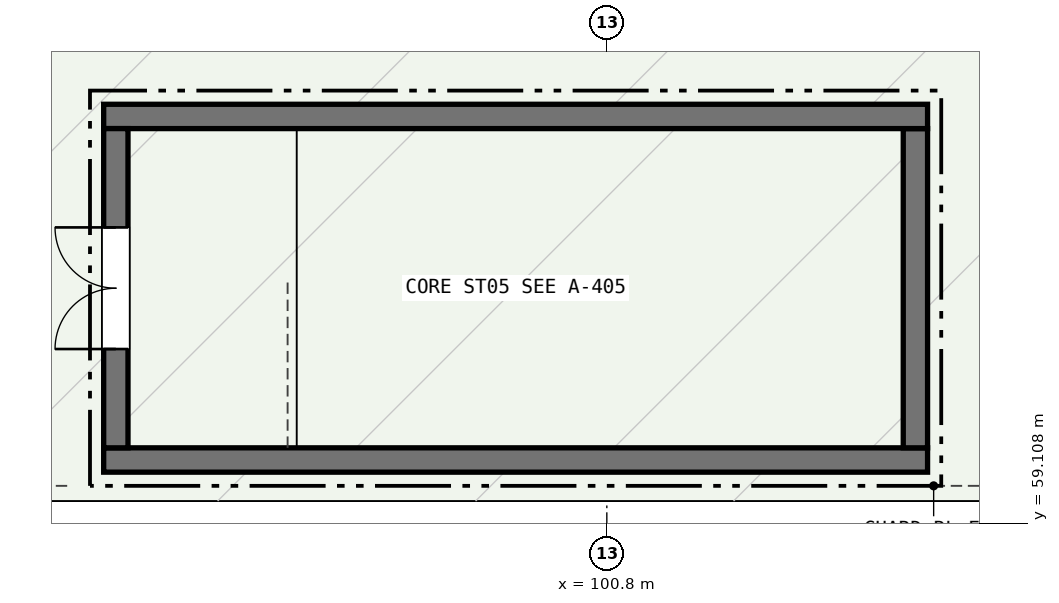
"""IFC4 building model, lengths in metres.
Left out: names, types, materials, properties, quantities, classifications, styles, units other than length and angle.
Written with IfcOpenShell. Run it as: python <this file> out.ifc"""

import sys

from ifc_helpers import new_model, si_unit, direction, frame, frame_2d, origin, place, context, subcontext, project, spatial, rectangle, extrude, element, fill, save


model = new_model("IFC4")
c1 = context("Model", 3, precision=1e-05, world=origin(), true_north=direction((0.0, 1.0)))
c2 = subcontext(c1, "Body", "Model", "MODEL_VIEW")
j1 = project(units=[si_unit("LENGTHUNIT", "METRE"), si_unit("PLANEANGLEUNIT", "RADIAN")], contexts=[c1])
p1 = place(None, origin())
s1 = spatial("IfcSite", under=j1, at=p1, CompositionType="ELEMENT")
p2 = place(p1, origin())
s2 = spatial("IfcBuilding", under=s1, at=p2, CompositionType="ELEMENT")
p3 = place(p2, frame((0.0, 0.0, 21.6)))
s3 = spatial("IfcBuildingStorey", under=s2, at=p3, CompositionType="ELEMENT", Elevation=21.6)
p4 = place(p3, frame((94.18, 59.94, 0.0), z_axis=(0.0, 0.0, 1.0), x_axis=(1.0, 0.0, 0.0)))
e1 = element("IfcWall", 1, at=p4, inside=s3, PredefinedType="SHEAR", context=c2, shape_type="SweptSolid", body=[
    extrude(rectangle(XDim=10.84, YDim=0.32, at=frame_2d((5.42, 0.0))), origin(), (0.0, 0.0, 1.0), 3.2),
])
p5 = place(p3, frame((104.86, 60.1, 0.0), z_axis=(0.0, 0.0, 1.0), x_axis=(0.0, 1.0, 0.0)))
e2 = element("IfcWall", 2, at=p5, inside=s3, PredefinedType="SHEAR", context=c2, shape_type="SweptSolid", body=[
    extrude(rectangle(XDim=4.2, YDim=0.32, at=frame_2d((2.1, 0.0))), origin(), (0.0, 0.0, 1.0), 3.2),
])
p6 = place(p3, frame((105.02, 64.46, 0.0), z_axis=(0.0, 0.0, 1.0), x_axis=(-1.0, 0.0, 0.0)))
e3 = element("IfcWall", 3, at=p6, inside=s3, PredefinedType="SHEAR", context=c2, shape_type="SweptSolid", body=[
    extrude(rectangle(XDim=10.84, YDim=0.32, at=frame_2d((5.42, 0.0))), origin(), (0.0, 0.0, 1.0), 3.2),
])
p7 = place(p3, frame((94.34, 64.3, 0.0), z_axis=(0.0, 0.0, 1.0), x_axis=(0.0, -1.0, 0.0)))
e4 = element("IfcWall", 4, at=p7, inside=s3, PredefinedType="SHEAR", context=c2, shape_type="SweptSolid", body=[
    extrude(rectangle(XDim=4.2, YDim=0.32, at=frame_2d((2.1, 0.0))), origin(), (0.0, 0.0, 1.0), 3.2),
])
p8 = place(p7, frame((1.3, 0.0, 0.0)))
e5 = element("IfcOpeningElement", 5, at=p8, cuts=e4, PredefinedType="OPENING", context=c2, shape_type="SweptSolid", body=[
    extrude(rectangle(XDim=1.6, YDim=2.2, at=frame_2d((0.8, 1.1))), frame((0.0, 0.17, 0.0), z_axis=(0.0, -1.0, 0.0), x_axis=(1.0, 0.0, 0.0)), (0.0, 0.0, 1.0), 0.34),
])
p9 = place(p8, frame((1.6, 0.0, 0.0), z_axis=(0.0, 0.0, 1.0), x_axis=(-1.0, 0.0, 0.0)))
e6 = element("IfcDoor", 6, at=p9, inside=s3, OperationType="DOUBLE_DOOR_SINGLE_SWING", PredefinedType="DOOR", context=c2, shape_type="SweptSolid", body=[
    extrude(rectangle(XDim=1.6, YDim=2.2, at=frame_2d((0.8, 1.1))), frame((0.0, 0.025, 0.0), z_axis=(0.0, -1.0, 0.0), x_axis=(1.0, 0.0, 0.0)), (0.0, 0.0, 1.0), 0.05),
])
fill(e5, e6)
save(model, sys.argv[1])
